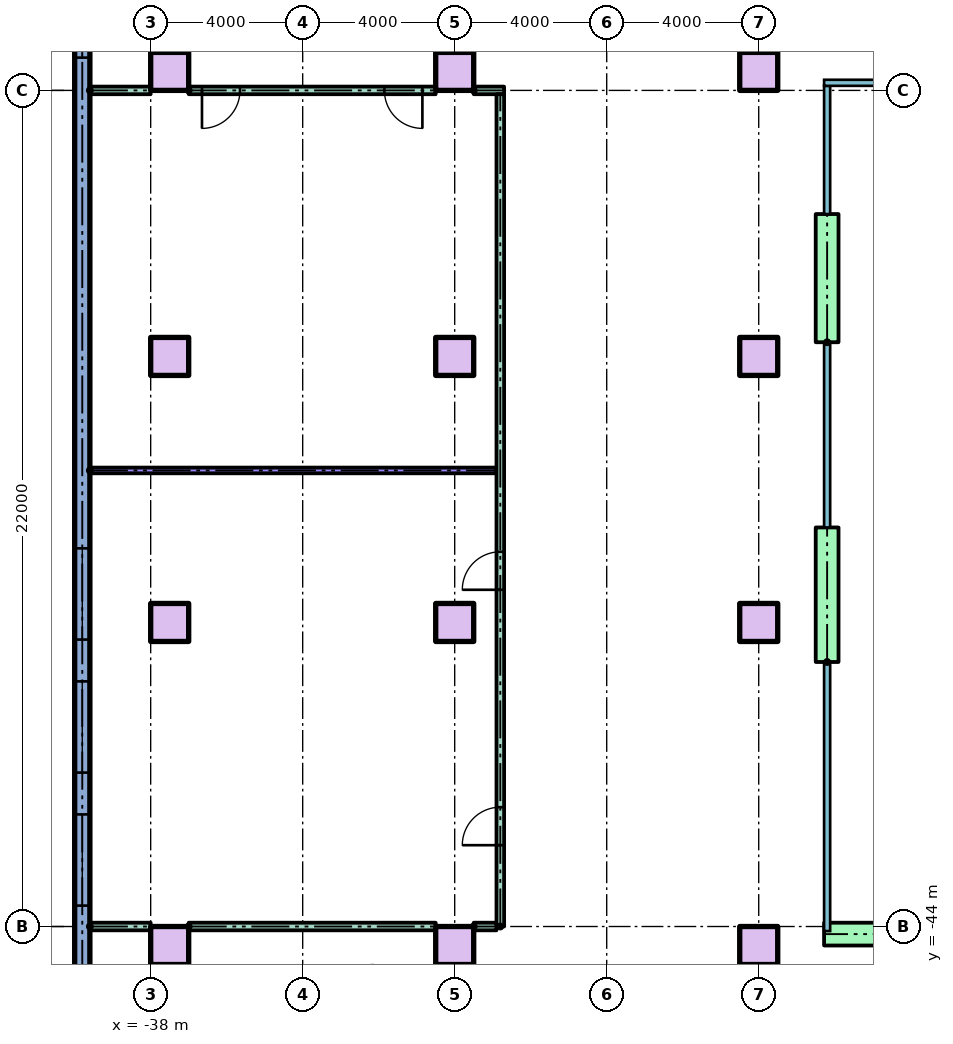
"""IFC4 building model, lengths in metres.
Left out: names, types, materials, properties, quantities, classifications, styles, units other than length and angle.
Written with IfcOpenShell. Run it as: python <this file> out.ifc"""

import sys

from ifc_helpers import new_model, si_unit, direction, frame, frame_2d, origin, origin_2d, place, context, subcontext, project, spatial, rectangle, extrude, element, fill, save


model = new_model("IFC4")
c1 = context("Model", 3, precision=1e-05, world=origin(), true_north=direction((0.0, 1.0)))
c2 = subcontext(c1, "Body", "Model", "MODEL_VIEW")
j1 = project(units=[si_unit("LENGTHUNIT", "METRE"), si_unit("PLANEANGLEUNIT", "RADIAN")], contexts=[c1])
p1 = place(None, origin())
s1 = spatial("IfcSite", under=j1, at=p1, CompositionType="ELEMENT")
p2 = place(p1, origin())
s2 = spatial("IfcBuilding", under=s1, at=p2, CompositionType="ELEMENT")
p3 = place(p2, frame((0.0, 0.0, 18.0)))
s3 = spatial("IfcBuildingStorey", under=s2, at=p3, CompositionType="ELEMENT", Elevation=18.0)
for number, where in (
    (1, (-37.5, -44.5, 0.0)),
    (2, (-30.0, -44.5, 0.0)),
    (3, (-22.0, -44.5, 0.0)),
    (4, (-37.5, -36.0, 0.0)),
    (5, (-30.0, -36.0, 0.0)),
    (6, (-22.0, -36.0, 0.0)),
    (7, (-37.5, -29.0, 0.0)),
    (8, (-30.0, -29.0, 0.0)),
    (9, (-22.0, -29.0, 0.0)),
    (10, (-37.5, -21.5, 0.0)),
    (11, (-30.0, -21.5, 0.0)),
    (12, (-22.0, -21.5, 0.0)),
):
    element("IfcColumn", number, at=place(p3, frame(where)), inside=s3, PredefinedType="COLUMN", context=c2, shape_type="SweptSolid", body=[
        extrude(rectangle(XDim=1.0, YDim=1.0, at=origin_2d()), origin(), (0.0, 0.0, 1.0), 4.0),
    ])
p4 = place(p3, frame((-39.8, 20.0, 0.0), z_axis=(0.0, 0.0, 1.0), x_axis=(0.0, -1.0, 0.0)))
e13 = element("IfcWall", 13, at=p4, inside=s3, PredefinedType="STANDARD", context=c2, shape_type="SweptSolid", body=[
    extrude(rectangle(XDim=70.0, YDim=0.4, at=frame_2d((35.0, 0.0))), origin(), (0.0, 0.0, 1.0), 3.7),
])
p5 = place(p4, frame((1.05, 0.0, 0.9)))
e14 = element("IfcOpeningElement", 14, at=p5, cuts=e13, PredefinedType="OPENING", context=c2, shape_type="SweptSolid", body=[
    extrude(rectangle(XDim=2.4, YDim=2.1, at=frame_2d((1.2, 1.05))), frame((0.0, 0.21, 0.0), z_axis=(0.0, -1.0, 0.0), x_axis=(1.0, 0.0, 0.0)), (0.0, 0.0, 1.0), 0.42),
])
p6 = place(p4, frame((5.55, 0.0, 0.9)))
e15 = element("IfcOpeningElement", 15, at=p6, cuts=e13, PredefinedType="OPENING", context=c2, shape_type="SweptSolid", body=[
    extrude(rectangle(XDim=2.4, YDim=2.1, at=frame_2d((1.2, 1.05))), frame((0.0, 0.21, 0.0), z_axis=(0.0, -1.0, 0.0), x_axis=(1.0, 0.0, 0.0)), (0.0, 0.0, 1.0), 0.42),
])
p7 = place(p4, frame((9.863, 0.0, 0.9)))
e16 = element("IfcOpeningElement", 16, at=p7, cuts=e13, PredefinedType="OPENING", context=c2, shape_type="SweptSolid", body=[
    extrude(rectangle(XDim=2.4, YDim=2.1, at=frame_2d((1.2, 1.05))), frame((0.0, 0.21, 0.0), z_axis=(0.0, -1.0, 0.0), x_axis=(1.0, 0.0, 0.0)), (0.0, 0.0, 1.0), 0.42),
])
p8 = place(p4, frame((13.988, 0.0, 0.9)))
e17 = element("IfcOpeningElement", 17, at=p8, cuts=e13, PredefinedType="OPENING", context=c2, shape_type="SweptSolid", body=[
    extrude(rectangle(XDim=2.4, YDim=2.1, at=frame_2d((1.2, 1.05))), frame((0.0, 0.21, 0.0), z_axis=(0.0, -1.0, 0.0), x_axis=(1.0, 0.0, 0.0)), (0.0, 0.0, 1.0), 0.42),
])
p9 = place(p4, frame((18.113, 0.0, 0.9)))
e18 = element("IfcOpeningElement", 18, at=p9, cuts=e13, PredefinedType="OPENING", context=c2, shape_type="SweptSolid", body=[
    extrude(rectangle(XDim=2.4, YDim=2.1, at=frame_2d((1.2, 1.05))), frame((0.0, 0.21, 0.0), z_axis=(0.0, -1.0, 0.0), x_axis=(1.0, 0.0, 0.0)), (0.0, 0.0, 1.0), 0.42),
])
p10 = place(p4, frame((22.238, 0.0, 0.9)))
e19 = element("IfcOpeningElement", 19, at=p10, cuts=e13, PredefinedType="OPENING", context=c2, shape_type="SweptSolid", body=[
    extrude(rectangle(XDim=2.4, YDim=2.1, at=frame_2d((1.2, 1.05))), frame((0.0, 0.21, 0.0), z_axis=(0.0, -1.0, 0.0), x_axis=(1.0, 0.0, 0.0)), (0.0, 0.0, 1.0), 0.42),
])
p11 = place(p4, frame((26.363, 0.0, 0.9)))
e20 = element("IfcOpeningElement", 20, at=p11, cuts=e13, PredefinedType="OPENING", context=c2, shape_type="SweptSolid", body=[
    extrude(rectangle(XDim=2.4, YDim=2.1, at=frame_2d((1.2, 1.05))), frame((0.0, 0.21, 0.0), z_axis=(0.0, -1.0, 0.0), x_axis=(1.0, 0.0, 0.0)), (0.0, 0.0, 1.0), 0.42),
])
p12 = place(p4, frame((30.488, 0.0, 0.9)))
e21 = element("IfcOpeningElement", 21, at=p12, cuts=e13, PredefinedType="OPENING", context=c2, shape_type="SweptSolid", body=[
    extrude(rectangle(XDim=2.4, YDim=2.1, at=frame_2d((1.2, 1.05))), frame((0.0, 0.21, 0.0), z_axis=(0.0, -1.0, 0.0), x_axis=(1.0, 0.0, 0.0)), (0.0, 0.0, 1.0), 0.42),
])
p13 = place(p4, frame((34.613, 0.0, 0.9)))
e22 = element("IfcOpeningElement", 22, at=p13, cuts=e13, PredefinedType="OPENING", context=c2, shape_type="SweptSolid", body=[
    extrude(rectangle(XDim=2.4, YDim=2.1, at=frame_2d((1.2, 1.05))), frame((0.0, 0.21, 0.0), z_axis=(0.0, -1.0, 0.0), x_axis=(1.0, 0.0, 0.0)), (0.0, 0.0, 1.0), 0.42),
])
p14 = place(p4, frame((38.738, 0.0, 0.9)))
e23 = element("IfcOpeningElement", 23, at=p14, cuts=e13, PredefinedType="OPENING", context=c2, shape_type="SweptSolid", body=[
    extrude(rectangle(XDim=2.4, YDim=2.1, at=frame_2d((1.2, 1.05))), frame((0.0, 0.21, 0.0), z_axis=(0.0, -1.0, 0.0), x_axis=(1.0, 0.0, 0.0)), (0.0, 0.0, 1.0), 0.42),
])
p15 = place(p4, frame((54.05, 0.0, 0.9)))
e24 = element("IfcOpeningElement", 24, at=p15, cuts=e13, PredefinedType="OPENING", context=c2, shape_type="SweptSolid", body=[
    extrude(rectangle(XDim=2.4, YDim=2.1, at=frame_2d((1.2, 1.05))), frame((0.0, 0.21, 0.0), z_axis=(0.0, -1.0, 0.0), x_axis=(1.0, 0.0, 0.0)), (0.0, 0.0, 1.0), 0.42),
])
p16 = place(p4, frame((57.55, 0.0, 0.9)))
e25 = element("IfcOpeningElement", 25, at=p16, cuts=e13, PredefinedType="OPENING", context=c2, shape_type="SweptSolid", body=[
    extrude(rectangle(XDim=2.4, YDim=2.1, at=frame_2d((1.2, 1.05))), frame((0.0, 0.21, 0.0), z_axis=(0.0, -1.0, 0.0), x_axis=(1.0, 0.0, 0.0)), (0.0, 0.0, 1.0), 0.42),
])
p17 = place(p4, frame((61.05, 0.0, 0.9)))
e26 = element("IfcOpeningElement", 26, at=p17, cuts=e13, PredefinedType="OPENING", context=c2, shape_type="SweptSolid", body=[
    extrude(rectangle(XDim=2.4, YDim=2.1, at=frame_2d((1.2, 1.05))), frame((0.0, 0.21, 0.0), z_axis=(0.0, -1.0, 0.0), x_axis=(1.0, 0.0, 0.0)), (0.0, 0.0, 1.0), 0.42),
])
p18 = place(p4, frame((66.85, 0.0, 0.9)))
e27 = element("IfcOpeningElement", 27, at=p18, cuts=e13, PredefinedType="OPENING", context=c2, shape_type="SweptSolid", body=[
    extrude(rectangle(XDim=2.4, YDim=2.1, at=frame_2d((1.2, 1.05))), frame((0.0, 0.21, 0.0), z_axis=(0.0, -1.0, 0.0), x_axis=(1.0, 0.0, 0.0)), (0.0, 0.0, 1.0), 0.42),
])
p19 = place(p3, frame((-18.0, -44.2, 0.0), z_axis=(0.0, 0.0, 1.0), x_axis=(-1.0, 0.0, 0.0)))
e28 = element("IfcWall", 28, at=p19, inside=s3, PredefinedType="STANDARD", context=c2, shape_type="SweptSolid", body=[
    extrude(rectangle(XDim=2.28, YDim=0.6, at=frame_2d((1.14, 0.0))), origin(), (0.0, 0.0, 1.0), 3.7),
])
p20 = place(p3, frame((-20.2, -37.04, 0.0), z_axis=(0.0, 0.0, 1.0), x_axis=(0.0, 1.0, 0.0)))
e29 = element("IfcWall", 29, at=p20, inside=s3, PredefinedType="STANDARD", context=c2, shape_type="SweptSolid", body=[
    extrude(rectangle(XDim=3.54, YDim=0.6, at=frame_2d((1.77, 0.0))), origin(), (0.0, 0.0, 1.0), 3.7),
])
p21 = place(p3, frame((-20.2, -28.627, 0.0), z_axis=(0.0, 0.0, 1.0), x_axis=(0.0, 1.0, 0.0)))
e30 = element("IfcWall", 30, at=p21, inside=s3, PredefinedType="STANDARD", context=c2, shape_type="SweptSolid", body=[
    extrude(rectangle(XDim=3.373, YDim=0.6, at=frame_2d((1.687, 0.0))), origin(), (0.0, 0.0, 1.0), 3.7),
])
p22 = place(p3, frame((-39.6, -44.0, 0.0)))
e31 = element("IfcWall", 31, at=p22, inside=s3, PredefinedType="PARTITIONING", context=c2, shape_type="SweptSolid", body=[
    extrude(rectangle(XDim=1.6, YDim=0.2, at=frame_2d((0.8, 0.0))), origin(), (0.0, 0.0, 1.0), 3.7),
])
p23 = place(p3, frame((-37.0, -44.0, 0.0)))
e32 = element("IfcWall", 32, at=p23, inside=s3, PredefinedType="PARTITIONING", context=c2, shape_type="SweptSolid", body=[
    extrude(rectangle(XDim=6.5, YDim=0.2, at=frame_2d((3.25, 0.0))), origin(), (0.0, 0.0, 1.0), 3.7),
])
p24 = place(p3, frame((-29.5, -44.0, 0.0)))
e33 = element("IfcWall", 33, at=p24, inside=s3, PredefinedType="PARTITIONING", context=c2, shape_type="SweptSolid", body=[
    extrude(rectangle(XDim=0.6, YDim=0.2, at=frame_2d((0.3, 0.0))), origin(), (0.0, 0.0, 1.0), 3.7),
])
p25 = place(p3, frame((-39.6, -32.0, 0.0)))
e34 = element("IfcWall", 34, at=p25, inside=s3, PredefinedType="PARTITIONING", context=c2, shape_type="SweptSolid", body=[
    extrude(rectangle(XDim=10.7, YDim=0.15, at=frame_2d((5.35, 0.0))), origin(), (0.0, 0.0, 1.0), 3.7),
])
p26 = place(p3, frame((-39.6, -22.0, 0.0)))
e35 = element("IfcWall", 35, at=p26, inside=s3, PredefinedType="PARTITIONING", context=c2, shape_type="SweptSolid", body=[
    extrude(rectangle(XDim=1.6, YDim=0.2, at=frame_2d((0.8, 0.0))), origin(), (0.0, 0.0, 1.0), 3.7),
])
p27 = place(p3, frame((-37.0, -22.0, 0.0)))
e36 = element("IfcWall", 36, at=p27, inside=s3, PredefinedType="PARTITIONING", context=c2, shape_type="SweptSolid", body=[
    extrude(rectangle(XDim=6.5, YDim=0.2, at=frame_2d((3.25, 0.0))), origin(), (0.0, 0.0, 1.0), 3.7),
])
p28 = place(p27, frame((0.35, 0.0, 0.0)))
e37 = element("IfcOpeningElement", 37, at=p28, cuts=e36, PredefinedType="OPENING", context=c2, shape_type="SweptSolid", body=[
    extrude(rectangle(XDim=1.0, YDim=2.1, at=frame_2d((0.5, 1.05))), frame((0.0, 0.11, 0.0), z_axis=(0.0, -1.0, 0.0), x_axis=(1.0, 0.0, 0.0)), (0.0, 0.0, 1.0), 0.22),
])
p29 = place(p27, frame((5.15, 0.0, 0.0)))
e38 = element("IfcOpeningElement", 38, at=p29, cuts=e36, PredefinedType="OPENING", context=c2, shape_type="SweptSolid", body=[
    extrude(rectangle(XDim=1.0, YDim=2.1, at=frame_2d((0.5, 1.05))), frame((0.0, 0.11, 0.0), z_axis=(0.0, -1.0, 0.0), x_axis=(1.0, 0.0, 0.0)), (0.0, 0.0, 1.0), 0.22),
])
p30 = place(p3, frame((-29.5, -22.0, 0.0)))
e39 = element("IfcWall", 39, at=p30, inside=s3, PredefinedType="PARTITIONING", context=c2, shape_type="SweptSolid", body=[
    extrude(rectangle(XDim=0.8, YDim=0.2, at=frame_2d((0.4, 0.0))), origin(), (0.0, 0.0, 1.0), 3.7),
])
p31 = place(p3, frame((-28.8, -44.0, 0.0), z_axis=(0.0, 0.0, 1.0), x_axis=(0.0, 1.0, 0.0)))
e40 = element("IfcWall", 40, at=p31, inside=s3, PredefinedType="PARTITIONING", context=c2, shape_type="SweptSolid", body=[
    extrude(rectangle(XDim=21.9, YDim=0.2, at=frame_2d((10.95, 0.0))), origin(), (0.0, 0.0, 1.0), 3.7),
])
p32 = place(p31, frame((2.14, 0.0, 0.0)))
e41 = element("IfcOpeningElement", 41, at=p32, cuts=e40, PredefinedType="OPENING", context=c2, shape_type="SweptSolid", body=[
    extrude(rectangle(XDim=1.0, YDim=2.1, at=frame_2d((0.5, 1.05))), frame((0.0, 0.11, 0.0), z_axis=(0.0, -1.0, 0.0), x_axis=(1.0, 0.0, 0.0)), (0.0, 0.0, 1.0), 0.22),
])
p33 = place(p31, frame((8.86, 0.0, 0.0)))
e42 = element("IfcOpeningElement", 42, at=p33, cuts=e40, PredefinedType="OPENING", context=c2, shape_type="SweptSolid", body=[
    extrude(rectangle(XDim=1.0, YDim=2.1, at=frame_2d((0.5, 1.05))), frame((0.0, 0.11, 0.0), z_axis=(0.0, -1.0, 0.0), x_axis=(1.0, 0.0, 0.0)), (0.0, 0.0, 1.0), 0.22),
])
p34 = place(p14, origin())
e43 = element("IfcWindow", 43, at=p34, inside=s3, PartitioningType="SINGLE_PANEL", PredefinedType="WINDOW", context=c2, shape_type="SweptSolid", body=[
    extrude(rectangle(XDim=2.4, YDim=2.1, at=frame_2d((1.2, 1.05))), frame((0.0, 0.03, 0.0), z_axis=(0.0, -1.0, 0.0), x_axis=(1.0, 0.0, 0.0)), (0.0, 0.0, 1.0), 0.06),
])
fill(e23, e43)
p35 = place(p15, origin())
e44 = element("IfcWindow", 44, at=p35, inside=s3, PartitioningType="SINGLE_PANEL", PredefinedType="WINDOW", context=c2, shape_type="SweptSolid", body=[
    extrude(rectangle(XDim=2.4, YDim=2.1, at=frame_2d((1.2, 1.05))), frame((0.0, 0.03, 0.0), z_axis=(0.0, -1.0, 0.0), x_axis=(1.0, 0.0, 0.0)), (0.0, 0.0, 1.0), 0.06),
])
fill(e24, e44)
p36 = place(p16, origin())
e45 = element("IfcWindow", 45, at=p36, inside=s3, PartitioningType="SINGLE_PANEL", PredefinedType="WINDOW", context=c2, shape_type="SweptSolid", body=[
    extrude(rectangle(XDim=2.4, YDim=2.1, at=frame_2d((1.2, 1.05))), frame((0.0, 0.03, 0.0), z_axis=(0.0, -1.0, 0.0), x_axis=(1.0, 0.0, 0.0)), (0.0, 0.0, 1.0), 0.06),
])
fill(e25, e45)
p37 = place(p17, origin())
e46 = element("IfcWindow", 46, at=p37, inside=s3, PartitioningType="SINGLE_PANEL", PredefinedType="WINDOW", context=c2, shape_type="SweptSolid", body=[
    extrude(rectangle(XDim=2.4, YDim=2.1, at=frame_2d((1.2, 1.05))), frame((0.0, 0.03, 0.0), z_axis=(0.0, -1.0, 0.0), x_axis=(1.0, 0.0, 0.0)), (0.0, 0.0, 1.0), 0.06),
])
fill(e26, e46)
p38 = place(p32, origin())
e47 = element("IfcDoor", 47, at=p38, inside=s3, OperationType="SINGLE_SWING_LEFT", PredefinedType="DOOR", context=c2, shape_type="SweptSolid", body=[
    extrude(rectangle(XDim=1.0, YDim=2.1, at=frame_2d((0.5, 1.05))), frame((0.0, 0.025, 0.0), z_axis=(0.0, -1.0, 0.0), x_axis=(1.0, 0.0, 0.0)), (0.0, 0.0, 1.0), 0.05),
])
fill(e41, e47)
p39 = place(p33, origin())
e48 = element("IfcDoor", 48, at=p39, inside=s3, OperationType="SINGLE_SWING_LEFT", PredefinedType="DOOR", context=c2, shape_type="SweptSolid", body=[
    extrude(rectangle(XDim=1.0, YDim=2.1, at=frame_2d((0.5, 1.05))), frame((0.0, 0.025, 0.0), z_axis=(0.0, -1.0, 0.0), x_axis=(1.0, 0.0, 0.0)), (0.0, 0.0, 1.0), 0.05),
])
fill(e42, e48)
p40 = place(p28, frame((1.0, 0.0, 0.0), z_axis=(0.0, 0.0, 1.0), x_axis=(-1.0, 0.0, 0.0)))
e49 = element("IfcDoor", 49, at=p40, inside=s3, OperationType="SINGLE_SWING_LEFT", PredefinedType="DOOR", context=c2, shape_type="SweptSolid", body=[
    extrude(rectangle(XDim=1.0, YDim=2.1, at=frame_2d((0.5, 1.05))), frame((0.0, 0.025, 0.0), z_axis=(0.0, -1.0, 0.0), x_axis=(1.0, 0.0, 0.0)), (0.0, 0.0, 1.0), 0.05),
])
fill(e37, e49)
p41 = place(p29, frame((1.0, 0.0, 0.0), z_axis=(0.0, 0.0, 1.0), x_axis=(-1.0, 0.0, 0.0)))
e50 = element("IfcDoor", 50, at=p41, inside=s3, OperationType="SINGLE_SWING_RIGHT", PredefinedType="DOOR", context=c2, shape_type="SweptSolid", body=[
    extrude(rectangle(XDim=1.0, YDim=2.1, at=frame_2d((0.5, 1.05))), frame((0.0, 0.025, 0.0), z_axis=(0.0, -1.0, 0.0), x_axis=(1.0, 0.0, 0.0)), (0.0, 0.0, 1.0), 0.05),
])
fill(e38, e50)
save(model, sys.argv[1])
